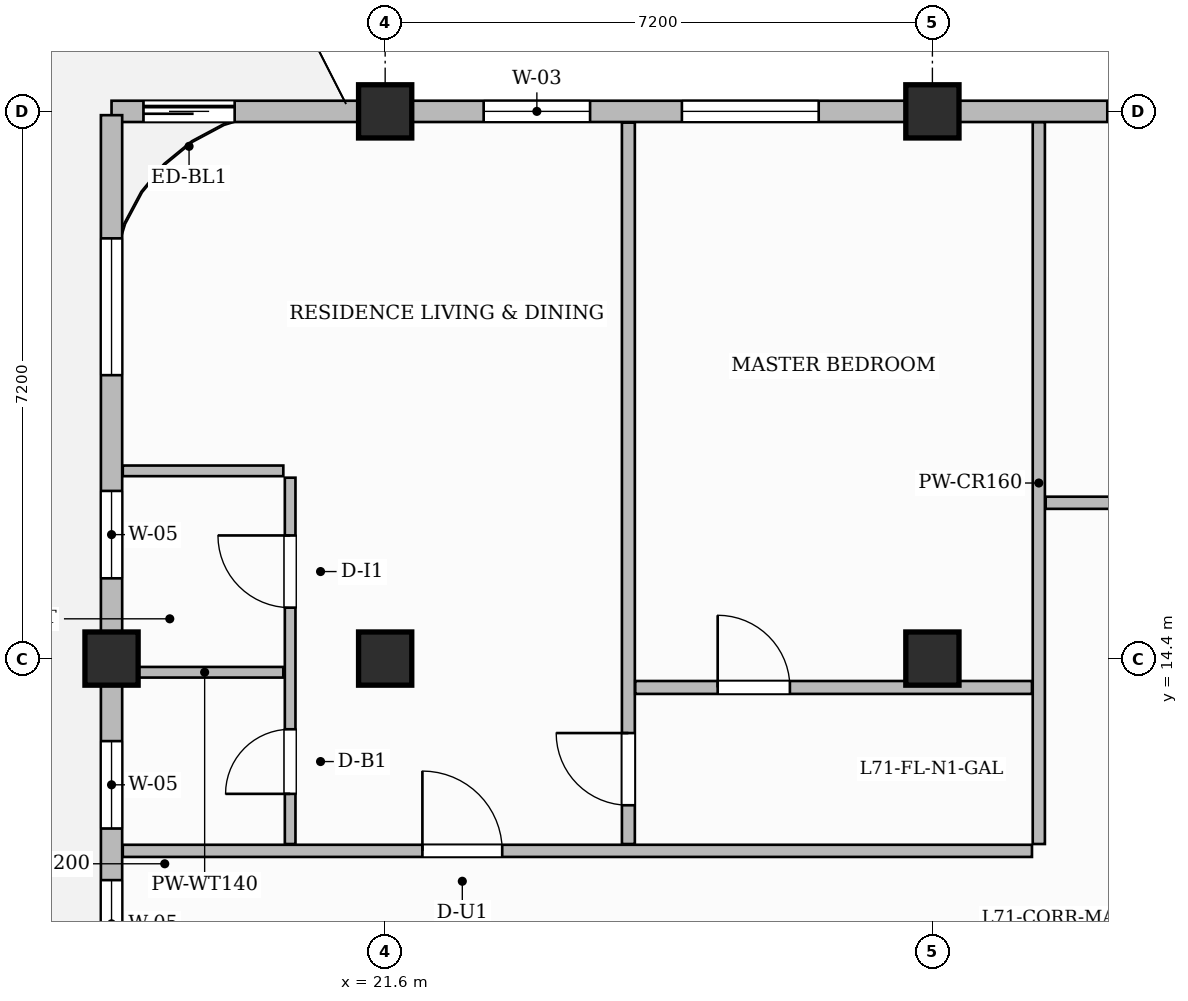
"""IFC4 building model, lengths in metres.
Left out: names, types, materials, properties, quantities, classifications, styles, units other than length and angle.
Written with IfcOpenShell. Run it as: python <this file> out.ifc"""

import sys

from ifc_helpers import new_model, si_unit, direction, frame, frame_2d, origin, origin_2d, place, context, subcontext, project, spatial, rectangle, extrude, source, transform, mapped, element, fill, save


model = new_model("IFC4")
c1 = context("Model", 3, precision=1e-05, world=origin(), true_north=direction((0.0, 1.0)))
c2 = subcontext(c1, "Body", "Model", "MODEL_VIEW")
j1 = project(units=[si_unit("LENGTHUNIT", "METRE"), si_unit("PLANEANGLEUNIT", "RADIAN")], contexts=[c1])
p1 = place(None, origin())
s1 = spatial("IfcSite", under=j1, at=p1, CompositionType="ELEMENT")
p2 = place(p1, origin())
s2 = spatial("IfcBuilding", under=s1, at=p2, CompositionType="ELEMENT")
p3 = place(p2, frame((0.0, 0.0, 282.75)))
s3 = spatial("IfcBuildingStorey", under=s2, at=p3, CompositionType="ELEMENT", Elevation=282.75)
m1 = source(origin(), c2, "Body", "SweptSolid", [
    extrude(rectangle(XDim=0.7, YDim=0.7, at=origin_2d()), origin(), (0.0, 0.0, 1.0), 3.85),
])
for number, where, z_axis, x_axis in (
    (1, (21.6, 14.4, 0.0), (0.0, 0.0, 1.0), (1.0, 0.0, 0.0)),
    (2, (21.6, 21.6, 0.0), (0.0, 0.0, 1.0), (1.0, 0.0, 0.0)),
    (3, (28.8, 14.4, 0.0), (0.0, 0.0, 1.0), (1.0, 0.0, 0.0)),
    (4, (28.8, 21.6, 0.0), (0.0, 0.0, 1.0), (1.0, 0.0, 0.0)),
    (5, (18.0, 14.4, 0.0), (0.0, 0.0, 1.0), (1.0, 0.0, 0.0)),
):
    element("IfcColumn", number, at=place(p3, frame(where, z_axis=z_axis, x_axis=x_axis)), inside=s3, PredefinedType="COLUMN", context=c2, shape_type="MappedRepresentation", body=[
        mapped(m1, transform((0.0, 0.0, 0.0), scale=1.0)),
    ])
p4 = place(p3, frame((18.148, 11.87, 0.0), z_axis=(0.0, 0.0, 1.0), x_axis=(1.0, 0.0, 0.0)))
e6 = element("IfcWall", 6, at=p4, inside=s3, PredefinedType="PARTITIONING", context=c2, shape_type="SweptSolid", body=[
    extrude(rectangle(XDim=11.962, YDim=0.16, at=frame_2d((5.981, 0.0))), origin(), (0.0, 0.0, 1.0), 3.6),
])
p5 = place(p4, frame((3.942, 0.0, 0.0)))
e7 = element("IfcOpeningElement", 7, at=p5, cuts=e6, PredefinedType="OPENING", context=c2, shape_type="SweptSolid", body=[
    extrude(rectangle(XDim=1.05, YDim=2.25, at=frame_2d((0.525, 1.125))), frame((0.0, 0.09, 0.0), z_axis=(0.0, -1.0, 0.0), x_axis=(1.0, 0.0, 0.0)), (0.0, 0.0, 1.0), 0.18),
])
p6 = place(p3, frame((30.2, 11.96, 0.0), z_axis=(0.0, 0.0, 1.0), x_axis=(0.0, 1.0, 0.0)))
e8 = element("IfcWall", 8, at=p6, inside=s3, PredefinedType="PARTITIONING", context=c2, shape_type="SweptSolid", body=[
    extrude(rectangle(XDim=9.5, YDim=0.16, at=frame_2d((4.75, 0.0))), origin(), (0.0, 0.0, 1.0), 3.6),
])
p7 = place(p3, frame((30.29, 16.45, 0.0), z_axis=(0.0, 0.0, 1.0), x_axis=(1.0, 0.0, 0.0)))
e9 = element("IfcWall", 9, at=p7, inside=s3, PredefinedType="PARTITIONING", context=c2, shape_type="SweptSolid", body=[
    extrude(rectangle(XDim=19.37, YDim=0.16, at=frame_2d((9.685, 0.0))), origin(), (0.0, 0.0, 1.0), 3.6),
])
p8 = place(p7, frame((1.285, 0.0, 0.0)))
e10 = element("IfcOpeningElement", 10, at=p8, cuts=e9, PredefinedType="OPENING", context=c2, shape_type="SweptSolid", body=[
    extrude(rectangle(XDim=0.85, YDim=2.1, at=frame_2d((0.425, 1.05))), frame((0.0, 0.09, 0.0), z_axis=(0.0, -1.0, 0.0), x_axis=(1.0, 0.0, 0.0)), (0.0, 0.0, 1.0), 0.18),
])
p9 = place(p7, frame((10.66, 0.0, 0.0)))
e11 = element("IfcOpeningElement", 11, at=p9, cuts=e9, PredefinedType="OPENING", context=c2, shape_type="SweptSolid", body=[
    extrude(rectangle(XDim=1.6, YDim=2.4, at=frame_2d((0.8, 1.2))), frame((0.0, 0.09, 0.0), z_axis=(0.0, -1.0, 0.0), x_axis=(1.0, 0.0, 0.0)), (0.0, 0.0, 1.0), 0.18),
])
p10 = place(p3, frame((20.35, 11.96, 0.0), z_axis=(0.0, 0.0, 1.0), x_axis=(0.0, 1.0, 0.0)))
e12 = element("IfcWall", 12, at=p10, inside=s3, PredefinedType="PARTITIONING", context=c2, shape_type="SweptSolid", body=[
    extrude(rectangle(XDim=4.82, YDim=0.14, at=frame_2d((2.41, 0.0))), origin(), (0.0, 0.0, 1.0), 3.6),
])
p11 = place(p10, frame((0.66, 0.0, 0.0)))
e13 = element("IfcOpeningElement", 13, at=p11, cuts=e12, PredefinedType="OPENING", context=c2, shape_type="SweptSolid", body=[
    extrude(rectangle(XDim=0.85, YDim=2.1, at=frame_2d((0.425, 1.05))), frame((0.0, 0.08, 0.0), z_axis=(0.0, -1.0, 0.0), x_axis=(1.0, 0.0, 0.0)), (0.0, 0.0, 1.0), 0.16),
])
p12 = place(p10, frame((3.11, 0.0, 0.0)))
e14 = element("IfcOpeningElement", 14, at=p12, cuts=e12, PredefinedType="OPENING", context=c2, shape_type="SweptSolid", body=[
    extrude(rectangle(XDim=0.95, YDim=2.15, at=frame_2d((0.475, 1.075))), frame((0.0, 0.08, 0.0), z_axis=(0.0, -1.0, 0.0), x_axis=(1.0, 0.0, 0.0)), (0.0, 0.0, 1.0), 0.16),
])
p13 = place(p3, frame((18.19, 14.22, 0.0), z_axis=(0.0, 0.0, 1.0), x_axis=(1.0, 0.0, 0.0)))
e15 = element("IfcWall", 15, at=p13, inside=s3, PredefinedType="PARTITIONING", context=c2, shape_type="SweptSolid", body=[
    extrude(rectangle(XDim=2.07, YDim=0.14, at=frame_2d((1.035, 0.0))), origin(), (0.0, 0.0, 1.0), 3.185),
])
p14 = place(p3, frame((18.148, 16.87, 0.0), z_axis=(0.0, 0.0, 1.0), x_axis=(1.0, 0.0, 0.0)))
e16 = element("IfcWall", 16, at=p14, inside=s3, PredefinedType="PARTITIONING", context=c2, shape_type="SweptSolid", body=[
    extrude(rectangle(XDim=2.112, YDim=0.14, at=frame_2d((1.056, 0.0))), origin(), (0.0, 0.0, 1.0), 3.6),
])
p15 = place(p3, frame((24.8, 11.96, 0.0), z_axis=(0.0, 0.0, 1.0), x_axis=(0.0, 1.0, 0.0)))
e17 = element("IfcWall", 17, at=p15, inside=s3, PredefinedType="PARTITIONING", context=c2, shape_type="SweptSolid", body=[
    extrude(rectangle(XDim=9.492, YDim=0.17, at=frame_2d((4.746, 0.0))), origin(), (0.0, 0.0, 1.0), 3.6),
])
p16 = place(p15, frame((0.51, 0.0, 0.0)))
e18 = element("IfcOpeningElement", 18, at=p16, cuts=e17, PredefinedType="OPENING", context=c2, shape_type="SweptSolid", body=[
    extrude(rectangle(XDim=0.95, YDim=2.15, at=frame_2d((0.475, 1.075))), frame((0.0, 0.095, 0.0), z_axis=(0.0, -1.0, 0.0), x_axis=(1.0, 0.0, 0.0)), (0.0, 0.0, 1.0), 0.19),
])
p17 = place(p3, frame((24.89, 14.02, 0.0), z_axis=(0.0, 0.0, 1.0), x_axis=(1.0, 0.0, 0.0)))
e19 = element("IfcWall", 19, at=p17, inside=s3, PredefinedType="PARTITIONING", context=c2, shape_type="SweptSolid", body=[
    extrude(rectangle(XDim=5.22, YDim=0.17, at=frame_2d((2.61, 0.0))), origin(), (0.0, 0.0, 1.0), 3.6),
])
p18 = place(p17, frame((1.085, 0.0, 0.0)))
e20 = element("IfcOpeningElement", 20, at=p18, cuts=e19, PredefinedType="OPENING", context=c2, shape_type="SweptSolid", body=[
    extrude(rectangle(XDim=0.95, YDim=2.15, at=frame_2d((0.475, 1.075))), frame((0.0, 0.095, 0.0), z_axis=(0.0, -1.0, 0.0), x_axis=(1.0, 0.0, 0.0)), (0.0, 0.0, 1.0), 0.19),
])
p19 = place(p3, frame((18.0, 21.6, 0.0), z_axis=(0.0, 0.0, 1.0), x_axis=(1.0, 0.0, 0.0)))
e21 = element("IfcWall", 21, at=p19, inside=s3, PredefinedType="SOLIDWALL", context=c2, shape_type="SweptSolid", body=[
    extrude(rectangle(XDim=31.8, YDim=0.28, at=frame_2d((15.9, 0.0))), origin(), (0.0, 0.0, 1.0), 3.185),
])
p20 = place(p19, frame((0.42, 0.0, 0.0)))
e22 = element("IfcOpeningElement", 22, at=p20, cuts=e21, PredefinedType="OPENING", context=c2, shape_type="SweptSolid", body=[
    extrude(rectangle(XDim=1.2, YDim=2.2, at=frame_2d((0.6, 1.1))), frame((0.0, 0.15, 0.0), z_axis=(0.0, -1.0, 0.0), x_axis=(1.0, 0.0, 0.0)), (0.0, 0.0, 1.0), 0.3),
])
p21 = place(p19, frame((4.896, 0.0, 0.8)))
e23 = element("IfcOpeningElement", 23, at=p21, cuts=e21, PredefinedType="OPENING", context=c2, shape_type="SweptSolid", body=[
    extrude(rectangle(XDim=1.4, YDim=1.85, at=frame_2d((0.7, 0.925))), frame((0.0, 0.15, 0.0), z_axis=(0.0, -1.0, 0.0), x_axis=(1.0, 0.0, 0.0)), (0.0, 0.0, 1.0), 0.3),
])
p22 = place(p19, frame((7.504, 0.0, 0.8)))
e24 = element("IfcOpeningElement", 24, at=p22, cuts=e21, PredefinedType="OPENING", context=c2, shape_type="SweptSolid", body=[
    extrude(rectangle(XDim=1.8, YDim=1.85, at=frame_2d((0.9, 0.925))), frame((0.0, 0.15, 0.0), z_axis=(0.0, -1.0, 0.0), x_axis=(1.0, 0.0, 0.0)), (0.0, 0.0, 1.0), 0.3),
])
p23 = place(p19, frame((13.101, 0.0, 0.8)))
e25 = element("IfcOpeningElement", 25, at=p23, cuts=e21, PredefinedType="OPENING", context=c2, shape_type="SweptSolid", body=[
    extrude(rectangle(XDim=1.8, YDim=1.85, at=frame_2d((0.9, 0.925))), frame((0.0, 0.15, 0.0), z_axis=(0.0, -1.0, 0.0), x_axis=(1.0, 0.0, 0.0)), (0.0, 0.0, 1.0), 0.3),
])
p24 = place(p19, frame((18.125, 0.0, 0.8)))
e26 = element("IfcOpeningElement", 26, at=p24, cuts=e21, PredefinedType="OPENING", context=c2, shape_type="SweptSolid", body=[
    extrude(rectangle(XDim=1.8, YDim=1.85, at=frame_2d((0.9, 0.925))), frame((0.0, 0.15, 0.0), z_axis=(0.0, -1.0, 0.0), x_axis=(1.0, 0.0, 0.0)), (0.0, 0.0, 1.0), 0.3),
])
p25 = place(p19, frame((20.875, 0.0, 0.8)))
e27 = element("IfcOpeningElement", 27, at=p25, cuts=e21, PredefinedType="OPENING", context=c2, shape_type="SweptSolid", body=[
    extrude(rectangle(XDim=1.8, YDim=1.85, at=frame_2d((0.9, 0.925))), frame((0.0, 0.15, 0.0), z_axis=(0.0, -1.0, 0.0), x_axis=(1.0, 0.0, 0.0)), (0.0, 0.0, 1.0), 0.3),
])
p26 = place(p19, frame((25.475, 0.0, 0.8)))
e28 = element("IfcOpeningElement", 28, at=p26, cuts=e21, PredefinedType="OPENING", context=c2, shape_type="SweptSolid", body=[
    extrude(rectangle(XDim=1.8, YDim=1.85, at=frame_2d((0.9, 0.925))), frame((0.0, 0.15, 0.0), z_axis=(0.0, -1.0, 0.0), x_axis=(1.0, 0.0, 0.0)), (0.0, 0.0, 1.0), 0.3),
])
p27 = place(p19, frame((28.525, 0.0, 0.8)))
e29 = element("IfcOpeningElement", 29, at=p27, cuts=e21, PredefinedType="OPENING", context=c2, shape_type="SweptSolid", body=[
    extrude(rectangle(XDim=1.8, YDim=1.85, at=frame_2d((0.9, 0.925))), frame((0.0, 0.15, 0.0), z_axis=(0.0, -1.0, 0.0), x_axis=(1.0, 0.0, 0.0)), (0.0, 0.0, 1.0), 0.3),
])
p28 = place(p3, frame((18.0, 0.05, 0.0), z_axis=(0.0, 0.0, 1.0), x_axis=(0.0, 1.0, 0.0)))
e30 = element("IfcWall", 30, at=p28, inside=s3, PredefinedType="SOLIDWALL", context=c2, shape_type="SweptSolid", body=[
    extrude(rectangle(XDim=21.5, YDim=0.28, at=frame_2d((10.75, 0.0))), origin(), (0.0, 0.0, 1.0), 3.6),
])
p29 = place(p28, frame((0.99, 0.0, 0.8)))
e31 = element("IfcOpeningElement", 31, at=p29, cuts=e30, PredefinedType="OPENING", context=c2, shape_type="SweptSolid", body=[
    extrude(rectangle(XDim=1.8, YDim=1.85, at=frame_2d((0.9, 0.925))), frame((0.0, 0.15, 0.0), z_axis=(0.0, -1.0, 0.0), x_axis=(1.0, 0.0, 0.0)), (0.0, 0.0, 1.0), 0.3),
])
p30 = place(p28, frame((3.93, 0.0, 0.8)))
e32 = element("IfcOpeningElement", 32, at=p30, cuts=e30, PredefinedType="OPENING", context=c2, shape_type="SweptSolid", body=[
    extrude(rectangle(XDim=1.8, YDim=1.85, at=frame_2d((0.9, 0.925))), frame((0.0, 0.15, 0.0), z_axis=(0.0, -1.0, 0.0), x_axis=(1.0, 0.0, 0.0)), (0.0, 0.0, 1.0), 0.3),
])
p31 = place(p28, frame((8.346, 0.0, 0.8)))
e33 = element("IfcOpeningElement", 33, at=p31, cuts=e30, PredefinedType="OPENING", context=c2, shape_type="SweptSolid", body=[
    extrude(rectangle(XDim=1.15, YDim=1.8, at=frame_2d((0.575, 0.9))), frame((0.0, 0.15, 0.0), z_axis=(0.0, -1.0, 0.0), x_axis=(1.0, 0.0, 0.0)), (0.0, 0.0, 1.0), 0.3),
])
p32 = place(p28, frame((10.285, 0.0, 0.8)))
e34 = element("IfcOpeningElement", 34, at=p32, cuts=e30, PredefinedType="OPENING", context=c2, shape_type="SweptSolid", body=[
    extrude(rectangle(XDim=1.15, YDim=1.8, at=frame_2d((0.575, 0.9))), frame((0.0, 0.15, 0.0), z_axis=(0.0, -1.0, 0.0), x_axis=(1.0, 0.0, 0.0)), (0.0, 0.0, 1.0), 0.3),
])
p33 = place(p28, frame((12.114, 0.0, 0.8)))
e35 = element("IfcOpeningElement", 35, at=p33, cuts=e30, PredefinedType="OPENING", context=c2, shape_type="SweptSolid", body=[
    extrude(rectangle(XDim=1.15, YDim=1.8, at=frame_2d((0.575, 0.9))), frame((0.0, 0.15, 0.0), z_axis=(0.0, -1.0, 0.0), x_axis=(1.0, 0.0, 0.0)), (0.0, 0.0, 1.0), 0.3),
])
p34 = place(p28, frame((15.406, 0.0, 0.8)))
e36 = element("IfcOpeningElement", 36, at=p34, cuts=e30, PredefinedType="OPENING", context=c2, shape_type="SweptSolid", body=[
    extrude(rectangle(XDim=1.15, YDim=1.8, at=frame_2d((0.575, 0.9))), frame((0.0, 0.15, 0.0), z_axis=(0.0, -1.0, 0.0), x_axis=(1.0, 0.0, 0.0)), (0.0, 0.0, 1.0), 0.3),
])
p35 = place(p28, frame((18.079, 0.0, 0.8)))
e37 = element("IfcOpeningElement", 37, at=p35, cuts=e30, PredefinedType="OPENING", context=c2, shape_type="SweptSolid", body=[
    extrude(rectangle(XDim=1.8, YDim=1.85, at=frame_2d((0.9, 0.925))), frame((0.0, 0.15, 0.0), z_axis=(0.0, -1.0, 0.0), x_axis=(1.0, 0.0, 0.0)), (0.0, 0.0, 1.0), 0.3),
])
m2 = source(origin(), c2, "Body", "SweptSolid", [
    extrude(rectangle(XDim=0.85, YDim=2.1, at=frame_2d((0.425, 1.05))), frame((0.0, 0.025, 0.0), z_axis=(0.0, -1.0, 0.0), x_axis=(1.0, 0.0, 0.0)), (0.0, 0.0, 1.0), 0.05),
])
p36 = place(p11, origin())
e38 = element("IfcDoor", 38, at=p36, inside=s3, OperationType="SINGLE_SWING_LEFT", PredefinedType="DOOR", context=c2, shape_type="MappedRepresentation", body=[
    mapped(m2, transform((0.0, 0.0, 0.0), scale=1.0)),
])
fill(e13, e38)
m3 = source(origin(), c2, "Body", "SweptSolid", [
    extrude(rectangle(XDim=0.95, YDim=2.15, at=frame_2d((0.475, 1.075))), frame((0.0, 0.025, 0.0), z_axis=(0.0, -1.0, 0.0), x_axis=(1.0, 0.0, 0.0)), (0.0, 0.0, 1.0), 0.05),
])
p37 = place(p12, origin())
e39 = element("IfcDoor", 39, at=p37, inside=s3, OperationType="SINGLE_SWING_RIGHT", PredefinedType="DOOR", context=c2, shape_type="MappedRepresentation", body=[
    mapped(m3, transform((0.0, 0.0, 0.0), scale=1.0)),
])
fill(e14, e39)
m4 = source(origin(), c2, "Body", "SweptSolid", [
    extrude(rectangle(XDim=1.05, YDim=2.25, at=frame_2d((0.525, 1.125))), frame((0.0, 0.025, 0.0), z_axis=(0.0, -1.0, 0.0), x_axis=(1.0, 0.0, 0.0)), (0.0, 0.0, 1.0), 0.05),
])
p38 = place(p5, origin())
e40 = element("IfcDoor", 40, at=p38, inside=s3, OperationType="SINGLE_SWING_LEFT", PredefinedType="DOOR", context=c2, shape_type="MappedRepresentation", body=[
    mapped(m4, transform((0.0, 0.0, 0.0), scale=1.0)),
])
fill(e7, e40)
p39 = place(p16, origin())
e41 = element("IfcDoor", 41, at=p39, inside=s3, OperationType="SINGLE_SWING_RIGHT", PredefinedType="DOOR", context=c2, shape_type="MappedRepresentation", body=[
    mapped(m3, transform((0.0, 0.0, 0.0), scale=1.0)),
])
fill(e18, e41)
p40 = place(p18, origin())
e42 = element("IfcDoor", 42, at=p40, inside=s3, OperationType="SINGLE_SWING_LEFT", PredefinedType="DOOR", context=c2, shape_type="MappedRepresentation", body=[
    mapped(m3, transform((0.0, 0.0, 0.0), scale=1.0)),
])
fill(e20, e42)
m5 = source(origin(), c2, "Body", "SweptSolid", [
    extrude(rectangle(XDim=1.2, YDim=2.2, at=frame_2d((0.6, 1.1))), frame((0.0, 0.025, 0.0), z_axis=(0.0, -1.0, 0.0), x_axis=(1.0, 0.0, 0.0)), (0.0, 0.0, 1.0), 0.05),
])
p41 = place(p20, origin())
e43 = element("IfcDoor", 43, at=p41, inside=s3, OperationType="SLIDING_TO_LEFT", PredefinedType="DOOR", context=c2, shape_type="MappedRepresentation", body=[
    mapped(m5, transform((0.0, 0.0, 0.0), scale=1.0)),
])
fill(e22, e43)
m6 = source(origin(), c2, "Body", "SweptSolid", [
    extrude(rectangle(XDim=1.4, YDim=1.85, at=frame_2d((0.7, 0.925))), frame((0.0, 0.03, 0.0), z_axis=(0.0, -1.0, 0.0), x_axis=(1.0, 0.0, 0.0)), (0.0, 0.0, 1.0), 0.06),
])
p42 = place(p21, origin())
e44 = element("IfcWindow", 44, at=p42, inside=s3, PartitioningType="SINGLE_PANEL", PredefinedType="WINDOW", context=c2, shape_type="MappedRepresentation", body=[
    mapped(m6, transform((0.0, 0.0, 0.0), scale=1.0)),
])
fill(e23, e44)
m7 = source(origin(), c2, "Body", "SweptSolid", [
    extrude(rectangle(XDim=1.8, YDim=1.85, at=frame_2d((0.9, 0.925))), frame((0.0, 0.03, 0.0), z_axis=(0.0, -1.0, 0.0), x_axis=(1.0, 0.0, 0.0)), (0.0, 0.0, 1.0), 0.06),
])
p43 = place(p22, origin())
e45 = element("IfcWindow", 45, at=p43, inside=s3, PartitioningType="DOUBLE_PANEL_VERTICAL", PredefinedType="WINDOW", context=c2, shape_type="MappedRepresentation", body=[
    mapped(m7, transform((0.0, 0.0, 0.0), scale=1.0)),
])
fill(e24, e45)
p44 = place(p23, origin())
e46 = element("IfcWindow", 46, at=p44, inside=s3, PartitioningType="DOUBLE_PANEL_VERTICAL", PredefinedType="WINDOW", context=c2, shape_type="MappedRepresentation", body=[
    mapped(m7, transform((0.0, 0.0, 0.0), scale=1.0)),
])
fill(e25, e46)
m8 = source(origin(), c2, "Body", "SweptSolid", [
    extrude(rectangle(XDim=1.15, YDim=1.8, at=frame_2d((0.575, 0.9))), frame((0.0, 0.03, 0.0), z_axis=(0.0, -1.0, 0.0), x_axis=(1.0, 0.0, 0.0)), (0.0, 0.0, 1.0), 0.06),
])
p45 = place(p32, origin())
e47 = element("IfcWindow", 47, at=p45, inside=s3, PartitioningType="SINGLE_PANEL", PredefinedType="WINDOW", context=c2, shape_type="MappedRepresentation", body=[
    mapped(m8, transform((0.0, 0.0, 0.0), scale=1.0)),
])
fill(e34, e47)
p46 = place(p33, origin())
e48 = element("IfcWindow", 48, at=p46, inside=s3, PartitioningType="SINGLE_PANEL", PredefinedType="WINDOW", context=c2, shape_type="MappedRepresentation", body=[
    mapped(m8, transform((0.0, 0.0, 0.0), scale=1.0)),
])
fill(e35, e48)
p47 = place(p34, origin())
e49 = element("IfcWindow", 49, at=p47, inside=s3, PartitioningType="SINGLE_PANEL", PredefinedType="WINDOW", context=c2, shape_type="MappedRepresentation", body=[
    mapped(m8, transform((0.0, 0.0, 0.0), scale=1.0)),
])
fill(e36, e49)
p48 = place(p35, origin())
e50 = element("IfcWindow", 50, at=p48, inside=s3, PartitioningType="DOUBLE_PANEL_VERTICAL", PredefinedType="WINDOW", context=c2, shape_type="MappedRepresentation", body=[
    mapped(m7, transform((0.0, 0.0, 0.0), scale=1.0)),
])
fill(e37, e50)
save(model, sys.argv[1])
